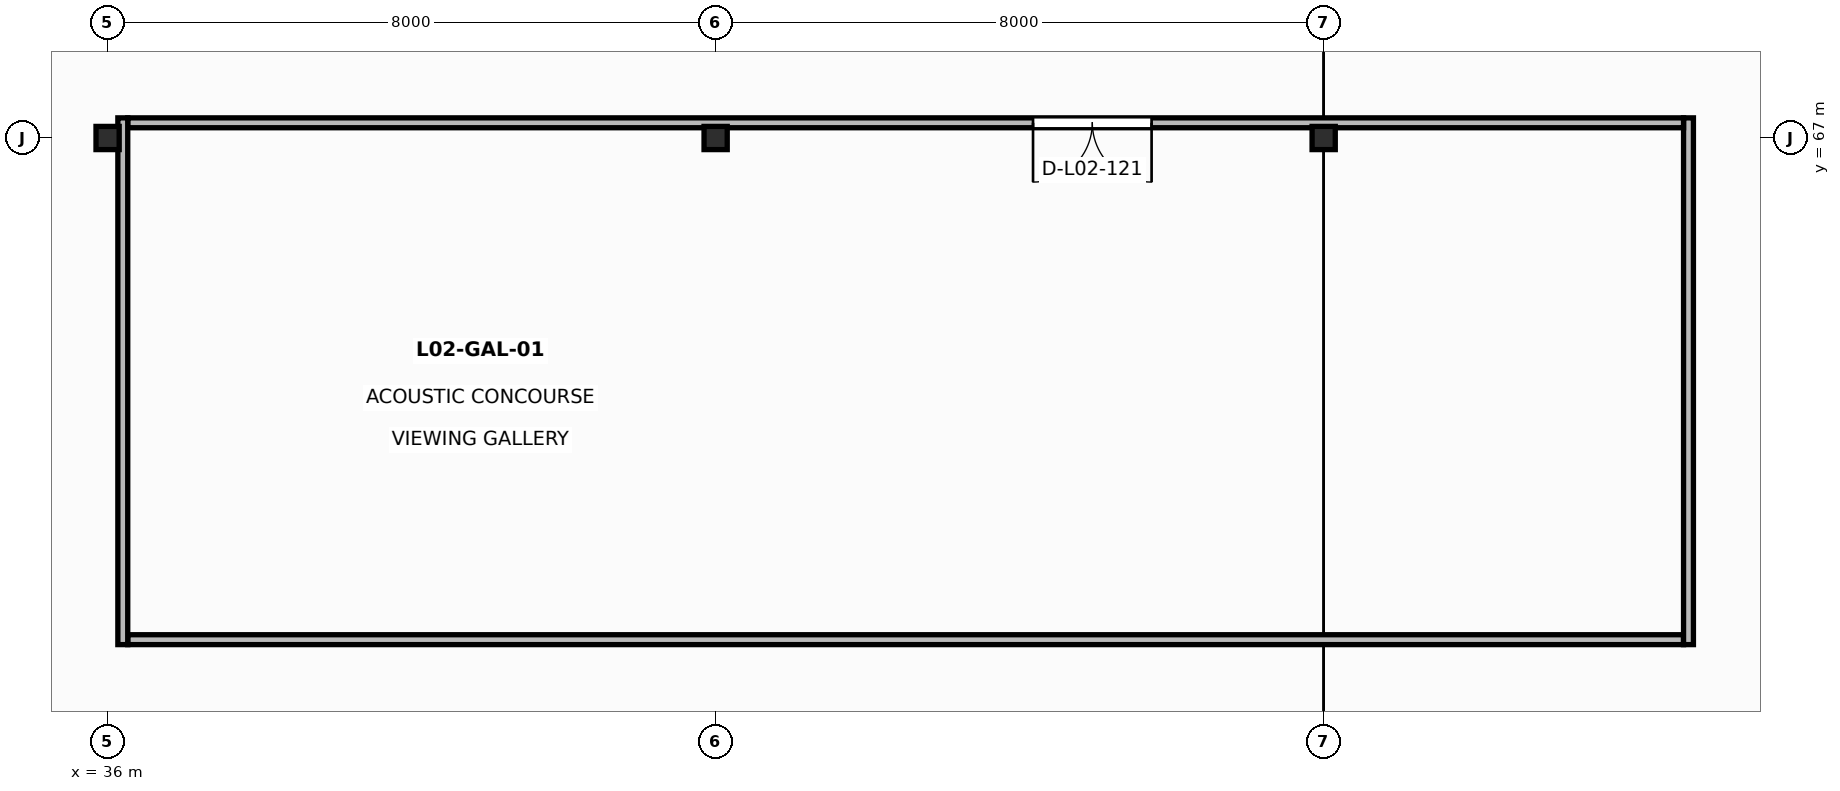
"""IFC4 building model, lengths in metres.
Left out: names, types, materials, properties, quantities, classifications, styles, units other than length and angle.
Written with IfcOpenShell. Run it as: python <this file> out.ifc"""

import sys

from ifc_helpers import new_model, si_unit, direction, frame, frame_2d, origin, origin_2d, place, context, subcontext, project, spatial, rectangle, hollow_rectangle, extrude, element, fill, save


model = new_model("IFC4")
c1 = context("Model", 3, precision=1e-05, world=origin(), true_north=direction((0.0, 1.0)))
c2 = subcontext(c1, "Body", "Model", "MODEL_VIEW")
j1 = project(units=[si_unit("LENGTHUNIT", "METRE"), si_unit("PLANEANGLEUNIT", "RADIAN")], contexts=[c1])
p1 = place(None, origin())
s1 = spatial("IfcSite", under=j1, at=p1, CompositionType="ELEMENT")
p2 = place(p1, origin())
s2 = spatial("IfcBuilding", under=s1, at=p2, CompositionType="ELEMENT")
p3 = place(p2, frame((0.0, 0.0, 11.2)))
s3 = spatial("IfcBuildingStorey", under=s2, at=p3, CompositionType="ELEMENT", Elevation=11.2)
p4 = place(p3, frame((36.0, 67.0, 0.0), z_axis=(0.0, 0.0, 1.0), x_axis=(1.0, 0.0, 0.0)))
e1 = element("IfcColumn", 1, at=p4, inside=s3, PredefinedType="COLUMN", context=c2, shape_type="SweptSolid", body=[
    extrude(hollow_rectangle(XDim=0.305, YDim=0.305, WallThickness=0.012, at=origin_2d()), origin(), (0.0, 0.0, 1.0), 4.3),
])
p5 = place(p3, frame((44.0, 67.0, 0.0), z_axis=(0.0, 0.0, 1.0), x_axis=(1.0, 0.0, 0.0)))
e2 = element("IfcColumn", 2, at=p5, inside=s3, PredefinedType="COLUMN", context=c2, shape_type="SweptSolid", body=[
    extrude(hollow_rectangle(XDim=0.305, YDim=0.305, WallThickness=0.012, at=origin_2d()), origin(), (0.0, 0.0, 1.0), 6.15),
])
p6 = place(p3, frame((52.0, 67.0, 0.0), z_axis=(0.0, 0.0, 1.0), x_axis=(1.0, 0.0, 0.0)))
e3 = element("IfcColumn", 3, at=p6, inside=s3, PredefinedType="COLUMN", context=c2, shape_type="SweptSolid", body=[
    extrude(hollow_rectangle(XDim=0.305, YDim=0.305, WallThickness=0.012, at=origin_2d()), origin(), (0.0, 0.0, 1.0), 4.3),
])
p7 = place(p3, frame((36.265, 60.4, 0.0), z_axis=(0.0, 0.0, 1.0), x_axis=(1.0, 0.0, 0.0)))
e4 = element("IfcWall", 4, at=p7, inside=s3, PredefinedType="PARTITIONING", context=c2, shape_type="SweptSolid", body=[
    extrude(rectangle(XDim=20.47, YDim=0.13, at=frame_2d((10.235, 0.0))), origin(), (0.0, 0.0, 1.0), 4.12),
])
p8 = place(p3, frame((56.8, 60.335, 0.0), z_axis=(0.0, 0.0, 1.0), x_axis=(0.0, 1.0, 0.0)))
e5 = element("IfcWall", 5, at=p8, inside=s3, PredefinedType="PARTITIONING", context=c2, shape_type="SweptSolid", body=[
    extrude(rectangle(XDim=6.93, YDim=0.13, at=frame_2d((3.465, 0.0))), origin(), (0.0, 0.0, 1.0), 4.12),
])
p9 = place(p3, frame((56.735, 67.2, 0.0), z_axis=(0.0, 0.0, 1.0), x_axis=(-1.0, 0.0, 0.0)))
e6 = element("IfcWall", 6, at=p9, inside=s3, PredefinedType="PARTITIONING", context=c2, shape_type="SweptSolid", body=[
    extrude(rectangle(XDim=20.47, YDim=0.13, at=frame_2d((10.235, 0.0))), origin(), (0.0, 0.0, 1.0), 4.12),
])
p10 = place(p9, frame((6.999, 0.0, 0.0)))
e7 = element("IfcOpeningElement", 7, at=p10, cuts=e6, PredefinedType="OPENING", context=c2, shape_type="SweptSolid", body=[
    extrude(rectangle(XDim=1.56, YDim=2.22, at=frame_2d((0.78, 1.11))), frame((0.0, 0.075, 0.0), z_axis=(0.0, -1.0, 0.0), x_axis=(1.0, 0.0, 0.0)), (0.0, 0.0, 1.0), 0.15),
])
p11 = place(p3, frame((36.2, 67.265, 0.0), z_axis=(0.0, 0.0, 1.0), x_axis=(0.0, -1.0, 0.0)))
e8 = element("IfcWall", 8, at=p11, inside=s3, PredefinedType="PARTITIONING", context=c2, shape_type="SweptSolid", body=[
    extrude(rectangle(XDim=6.93, YDim=0.13, at=frame_2d((3.465, 0.0))), origin(), (0.0, 0.0, 1.0), 4.12),
])
p12 = place(p10, origin())
e9 = element("IfcDoor", 9, at=p12, inside=s3, OperationType="DOUBLE_DOOR_SINGLE_SWING", PredefinedType="DOOR", context=c2, shape_type="SweptSolid", body=[
    extrude(rectangle(XDim=1.56, YDim=2.22, at=frame_2d((0.78, 1.11))), frame((0.0, 0.025, 0.0), z_axis=(0.0, -1.0, 0.0), x_axis=(1.0, 0.0, 0.0)), (0.0, 0.0, 1.0), 0.05),
])
fill(e7, e9)
save(model, sys.argv[1])
